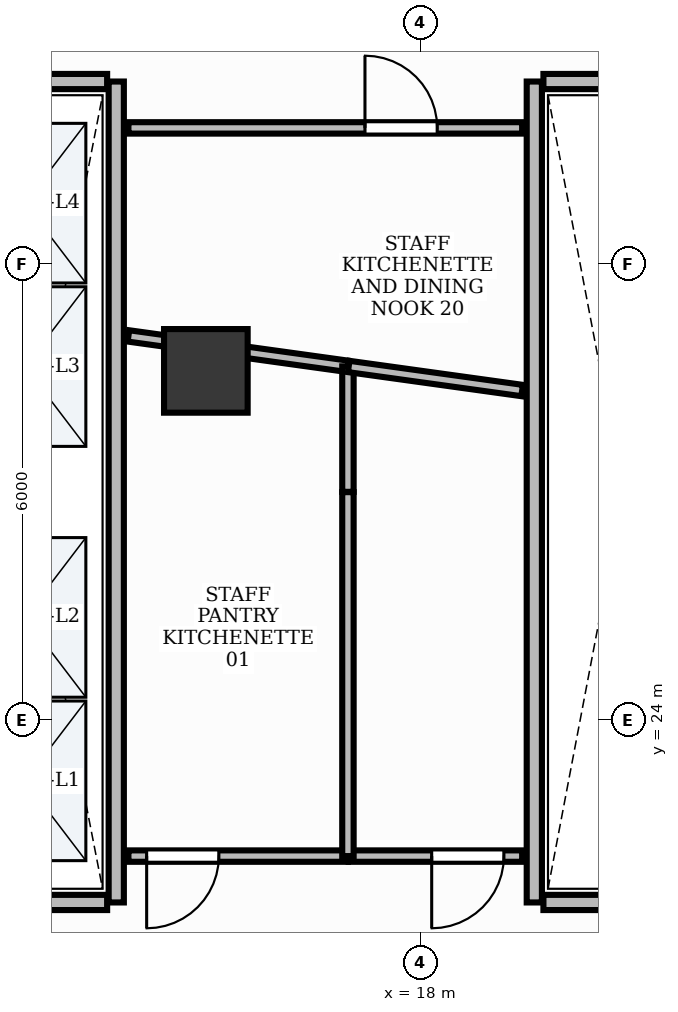
"""IFC4 building model, lengths in metres.
Left out: names, types, materials, properties, quantities, classifications, styles, units other than length and angle.
Written with IfcOpenShell. Run it as: python <this file> out.ifc"""

import sys

from ifc_helpers import new_model, si_unit, direction, frame, frame_2d, origin, origin_2d, place, context, subcontext, project, spatial, rectangle, extrude, element, fill, save


model = new_model("IFC4")
c1 = context("Model", 3, precision=1e-05, world=origin(), true_north=direction((0.0, 1.0)))
c2 = subcontext(c1, "Body", "Model", "MODEL_VIEW")
j1 = project(units=[si_unit("LENGTHUNIT", "METRE"), si_unit("PLANEANGLEUNIT", "RADIAN")], contexts=[c1])
p1 = place(None, origin())
s1 = spatial("IfcSite", under=j1, at=p1, CompositionType="ELEMENT")
p2 = place(p1, origin())
s2 = spatial("IfcBuilding", under=s1, at=p2, CompositionType="ELEMENT")
p3 = place(p2, frame((0.0, 0.0, 59.4)))
s3 = spatial("IfcBuildingStorey", under=s2, at=p3, CompositionType="ELEMENT", Elevation=59.4)
p4 = place(p3, frame((15.179, 28.594, -0.0), z_axis=(0.0, 0.0, 1.0), x_axis=(1.0, 0.0, 0.0)))
e1 = element("IfcColumn", 1, at=p4, inside=s3, PredefinedType="COLUMN", context=c2, shape_type="SweptSolid", body=[
    extrude(rectangle(XDim=1.1, YDim=1.1, at=origin_2d()), origin(), (0.0, 0.0, 1.0), 3.901),
])
p5 = place(p3, frame((14.0, 21.6, 0.0), z_axis=(0.0, 0.0, 1.0), x_axis=(0.0, 1.0, 0.0)))
e2 = element("IfcWall", 2, at=p5, inside=s3, PredefinedType="PARTITIONING", context=c2, shape_type="SweptSolid", body=[
    extrude(rectangle(XDim=10.8, YDim=0.2, at=frame_2d((5.4, 0.0))), origin(), (0.0, 0.0, 1.0), 2.91),
])
for number, where, z_axis, x_axis in (
    (3, (11.72, 21.6, 0.0), (0.0, 0.0, 1.0), (1.0, 0.0, 0.0)),
    (4, (11.72, 32.4, 0.0), (0.0, 0.0, 1.0), (1.0, 0.0, 0.0)),
):
    element("IfcWall", number, at=place(p3, frame(where, z_axis=z_axis, x_axis=x_axis)), inside=s3, PredefinedType="PARTITIONING", context=c2, shape_type="SweptSolid", body=[
        extrude(rectangle(XDim=2.16, YDim=0.2, at=frame_2d((1.08, 0.0))), origin(), (0.0, 0.0, 1.0), 2.91),
    ])
p6 = place(p3, frame((19.5, 21.6, 0.0), z_axis=(0.0, 0.0, 1.0), x_axis=(0.0, 1.0, 0.0)))
e5 = element("IfcWall", 5, at=p6, inside=s3, PredefinedType="PARTITIONING", context=c2, shape_type="SweptSolid", body=[
    extrude(rectangle(XDim=10.8, YDim=0.2, at=frame_2d((5.4, 0.0))), origin(), (0.0, 0.0, 1.0), 2.91),
])
for number, where, z_axis, x_axis in (
    (6, (19.62, 21.6, 0.0), (0.0, 0.0, 1.0), (1.0, 0.0, 0.0)),
    (7, (19.62, 32.4, 0.0), (0.0, 0.0, 1.0), (1.0, 0.0, 0.0)),
):
    element("IfcWall", number, at=place(p3, frame(where, z_axis=z_axis, x_axis=x_axis)), inside=s3, PredefinedType="PARTITIONING", context=c2, shape_type="SweptSolid", body=[
        extrude(rectangle(XDim=2.11, YDim=0.2, at=frame_2d((1.055, 0.0))), origin(), (0.0, 0.0, 1.0), 2.91),
    ])
p7 = place(p3, frame((17.048, 22.21, 0.0), z_axis=(0.0, 0.0, 1.0), x_axis=(-1.0, 0.0, 0.0)))
e8 = element("IfcWall", 8, at=p7, inside=s3, PredefinedType="PARTITIONING", context=c2, shape_type="SweptSolid", body=[
    extrude(rectangle(XDim=2.888, YDim=0.15, at=frame_2d((1.444, 0.0))), origin(), (0.0, 0.0, 1.0), 2.91),
])
p8 = place(p7, frame((1.698, 0.0, 0.0)))
e9 = element("IfcOpeningElement", 9, at=p8, cuts=e8, PredefinedType="OPENING", context=c2, shape_type="SweptSolid", body=[
    extrude(rectangle(XDim=0.95, YDim=2.15, at=frame_2d((0.475, 1.075))), frame((0.0, 0.09, 0.0), z_axis=(0.0, -1.0, 0.0), x_axis=(1.0, 0.0, 0.0)), (0.0, 0.0, 1.0), 0.18),
])
p9 = place(p3, frame((19.34, 22.21, 0.0), z_axis=(0.0, 0.0, 1.0), x_axis=(-1.0, 0.0, 0.0)))
e10 = element("IfcWall", 10, at=p9, inside=s3, PredefinedType="PARTITIONING", context=c2, shape_type="SweptSolid", body=[
    extrude(rectangle(XDim=2.282, YDim=0.15, at=frame_2d((1.141, 0.0))), origin(), (0.0, 0.0, 1.0), 2.91),
])
p10 = place(p9, frame((0.24, 0.0, 0.0)))
e11 = element("IfcOpeningElement", 11, at=p10, cuts=e10, PredefinedType="OPENING", context=c2, shape_type="SweptSolid", body=[
    extrude(rectangle(XDim=0.95, YDim=2.15, at=frame_2d((0.475, 1.075))), frame((0.0, 0.09, 0.0), z_axis=(0.0, -1.0, 0.0), x_axis=(1.0, 0.0, 0.0)), (0.0, 0.0, 1.0), 0.18),
])
p11 = place(p3, frame((14.16, 31.79, 0.0), z_axis=(0.0, 0.0, 1.0), x_axis=(1.0, 0.0, 0.0)))
e12 = element("IfcWall", 12, at=p11, inside=s3, PredefinedType="PARTITIONING", context=c2, shape_type="SweptSolid", body=[
    extrude(rectangle(XDim=5.18, YDim=0.15, at=frame_2d((2.59, 0.0))), origin(), (0.0, 0.0, 1.0), 2.91),
])
p12 = place(p11, frame((3.112, 0.0, 0.0)))
e13 = element("IfcOpeningElement", 13, at=p12, cuts=e12, PredefinedType="OPENING", context=c2, shape_type="SweptSolid", body=[
    extrude(rectangle(XDim=0.95, YDim=2.15, at=frame_2d((0.475, 1.075))), frame((0.0, 0.09, 0.0), z_axis=(0.0, -1.0, 0.0), x_axis=(1.0, 0.0, 0.0)), (0.0, 0.0, 1.0), 0.18),
])
p13 = place(p3, frame((14.16, 29.053, 0.0), z_axis=(0.0, 0.0, 1.0), x_axis=(0.990512548381, -0.137422310779, 0.0)))
e14 = element("IfcWall", 14, at=p13, inside=s3, PredefinedType="PARTITIONING", context=c2, shape_type="SweptSolid", body=[
    extrude(rectangle(XDim=2.915, YDim=0.15, at=frame_2d((1.458, 0.0))), origin(), (0.0, 0.0, 1.0), 2.91),
])
p14 = place(p3, frame((17.048, 28.653, 0.0), z_axis=(0.0, 0.0, 1.0), x_axis=(0.0, -1.0, 0.0)))
e15 = element("IfcWall", 15, at=p14, inside=s3, PredefinedType="PARTITIONING", context=c2, shape_type="SweptSolid", body=[
    extrude(rectangle(XDim=1.65, YDim=0.15, at=frame_2d((0.825, 0.0))), origin(), (0.0, 0.0, 1.0), 2.91),
])
p15 = place(p3, frame((17.048, 26.998, 0.0), z_axis=(0.0, 0.0, 1.0), x_axis=(0.0, -1.0, 0.0)))
e16 = element("IfcWall", 16, at=p15, inside=s3, PredefinedType="PARTITIONING", context=c2, shape_type="SweptSolid", body=[
    extrude(rectangle(XDim=4.788, YDim=0.15, at=frame_2d((2.394, 0.0))), origin(), (0.0, 0.0, 1.0), 2.91),
])
p16 = place(p3, frame((17.058, 28.651, 0.0), z_axis=(0.0, 0.0, 1.0), x_axis=(0.99050751053, -0.137458617714, 0.0)))
e17 = element("IfcWall", 17, at=p16, inside=s3, PredefinedType="PARTITIONING", context=c2, shape_type="SweptSolid", body=[
    extrude(rectangle(XDim=2.304, YDim=0.15, at=frame_2d((1.152, 0.0))), origin(), (0.0, 0.0, 1.0), 2.91),
])
p17 = place(p8, origin())
e18 = element("IfcDoor", 18, at=p17, inside=s3, OperationType="SINGLE_SWING_RIGHT", PredefinedType="DOOR", context=c2, shape_type="SweptSolid", body=[
    extrude(rectangle(XDim=0.95, YDim=2.15, at=frame_2d((0.475, 1.075))), frame((0.0, 0.025, 0.0), z_axis=(0.0, -1.0, 0.0), x_axis=(1.0, 0.0, 0.0)), (0.0, 0.0, 1.0), 0.05),
])
fill(e9, e18)
p18 = place(p10, origin())
e19 = element("IfcDoor", 19, at=p18, inside=s3, OperationType="SINGLE_SWING_RIGHT", PredefinedType="DOOR", context=c2, shape_type="SweptSolid", body=[
    extrude(rectangle(XDim=0.95, YDim=2.15, at=frame_2d((0.475, 1.075))), frame((0.0, 0.025, 0.0), z_axis=(0.0, -1.0, 0.0), x_axis=(1.0, 0.0, 0.0)), (0.0, 0.0, 1.0), 0.05),
])
fill(e11, e19)
p19 = place(p12, origin())
e20 = element("IfcDoor", 20, at=p19, inside=s3, OperationType="SINGLE_SWING_LEFT", PredefinedType="DOOR", context=c2, shape_type="SweptSolid", body=[
    extrude(rectangle(XDim=0.95, YDim=2.15, at=frame_2d((0.475, 1.075))), frame((0.0, 0.025, 0.0), z_axis=(0.0, -1.0, 0.0), x_axis=(1.0, 0.0, 0.0)), (0.0, 0.0, 1.0), 0.05),
])
fill(e13, e20)
save(model, sys.argv[1])
